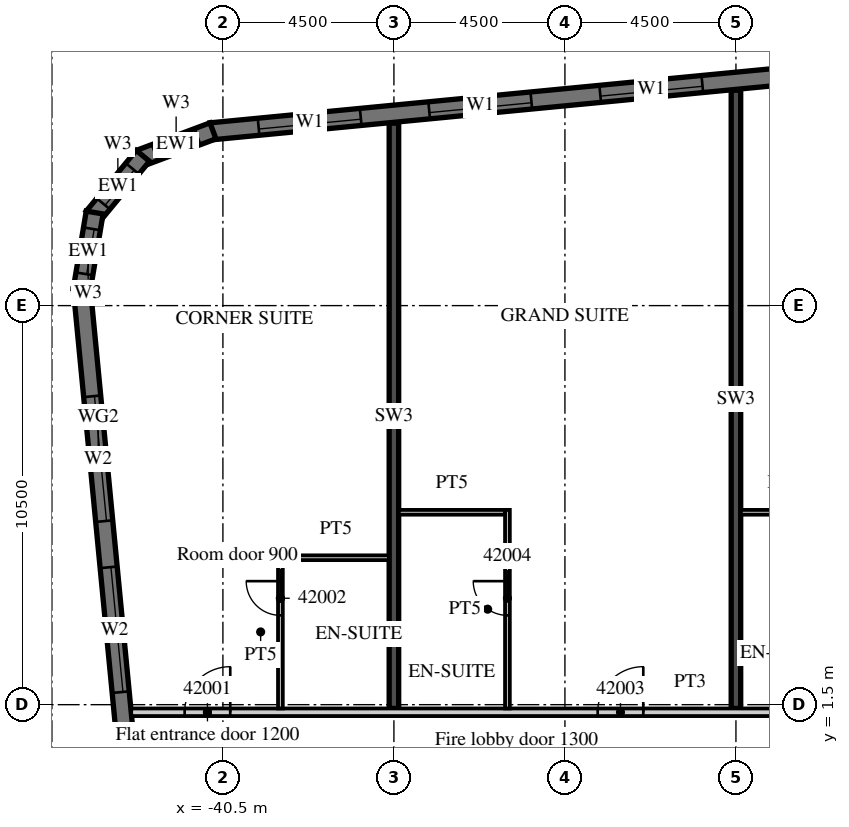
"""IFC4 building model, lengths in metres.
Left out: names, types, materials, properties, quantities, classifications, styles, units other than length and angle.
Written with IfcOpenShell. Run it as: python <this file> out.ifc"""

import sys

from ifc_helpers import new_model, si_unit, direction, frame, frame_2d, origin, place, context, subcontext, project, spatial, polyline, rectangle, outline, extrude, element, fill, save


model = new_model("IFC4")
c1 = context("Model", 3, precision=1e-05, world=origin(), true_north=direction((0.0, 1.0)))
c2 = subcontext(c1, "Body", "Model", "MODEL_VIEW")
j1 = project(units=[si_unit("LENGTHUNIT", "METRE"), si_unit("PLANEANGLEUNIT", "RADIAN")], contexts=[c1])
p1 = place(None, origin())
s1 = spatial("IfcSite", under=j1, at=p1, CompositionType="ELEMENT")
p2 = place(p1, origin())
s2 = spatial("IfcBuilding", under=s1, at=p2, CompositionType="ELEMENT")
p3 = place(p2, frame((0.0, 0.0, 180.1)))
s3 = spatial("IfcBuildingStorey", under=s2, at=p3, CompositionType="ELEMENT", Elevation=180.1)
p4 = place(p3, frame((-36.0, 1.4, 0.0), z_axis=(0.0, 0.0, 1.0), x_axis=(0.0, 1.0, 0.0)))
e1 = element("IfcWall", 1, at=p4, inside=s3, PredefinedType="SHEAR", context=c2, shape_type="SweptSolid", body=[
    extrude(rectangle(XDim=15.401, YDim=0.25, at=frame_2d((7.701, 0.0))), origin(), (0.0, 0.0, 1.0), 3.3),
])
p5 = place(p3, frame((-27.0, 1.4, 0.0), z_axis=(0.0, 0.0, 1.0), x_axis=(0.0, 1.0, 0.0)))
e2 = element("IfcWall", 2, at=p5, inside=s3, PredefinedType="SHEAR", context=c2, shape_type="SweptSolid", body=[
    extrude(rectangle(XDim=16.268, YDim=0.25, at=frame_2d((8.134, 0.0))), origin(), (0.0, 0.0, 1.0), 3.3),
])
p6 = place(p3, frame((-44.214, 12.466, 0.0), z_axis=(0.0, 0.0, 1.0), x_axis=(0.095847314626, -0.995396047952, 0.0)))
e3 = element("IfcWall", 3, at=p6, inside=s3, PredefinedType="SOLIDWALL", context=c2, shape_type="SweptSolid", body=[
    extrude(rectangle(XDim=34.0, YDim=0.45, at=frame_2d((17.0, 0.0))), origin(), (0.0, 0.0, 1.0), 3.02),
])
p7 = place(p6, frame((2.865, 0.0, 0.45)))
e4 = element("IfcOpeningElement", 4, at=p7, cuts=e3, PredefinedType="OPENING", context=c2, shape_type="SweptSolid", body=[
    extrude(rectangle(XDim=3.3, YDim=2.25, at=frame_2d((1.65, 1.125))), frame((0.0, 0.235, 0.0), z_axis=(0.0, -1.0, 0.0), x_axis=(1.0, 0.0, 0.0)), (0.0, 0.0, 1.0), 0.47),
])
p8 = place(p6, frame((7.386, 0.0, 0.45)))
e5 = element("IfcOpeningElement", 5, at=p8, cuts=e3, PredefinedType="OPENING", context=c2, shape_type="SweptSolid", body=[
    extrude(rectangle(XDim=3.3, YDim=2.25, at=frame_2d((1.65, 1.125))), frame((0.0, 0.235, 0.0), z_axis=(0.0, -1.0, 0.0), x_axis=(1.0, 0.0, 0.0)), (0.0, 0.0, 1.0), 0.47),
])
p9 = place(p3, frame((13.521, 21.817, 0.0), z_axis=(0.0, 0.0, 1.0), x_axis=(-0.995396508751, -0.095842529008, 0.0)))
e6 = element("IfcWall", 6, at=p9, inside=s3, PredefinedType="SOLIDWALL", context=c2, shape_type="SweptSolid", body=[
    extrude(rectangle(XDim=54.591, YDim=0.45, at=frame_2d((27.296, 0.0))), origin(), (0.0, 0.0, 1.0), 3.02),
])
p10 = place(p9, frame((0.91, 0.0, 0.45)))
e7 = element("IfcOpeningElement", 7, at=p10, cuts=e6, PredefinedType="OPENING", context=c2, shape_type="SweptSolid", body=[
    extrude(rectangle(XDim=2.7, YDim=2.25, at=frame_2d((1.35, 1.125))), frame((0.0, 0.235, 0.0), z_axis=(0.0, -1.0, 0.0), x_axis=(1.0, 0.0, 0.0)), (0.0, 0.0, 1.0), 0.47),
])
p11 = place(p9, frame((5.431, 0.0, 0.45)))
e8 = element("IfcOpeningElement", 8, at=p11, cuts=e6, PredefinedType="OPENING", context=c2, shape_type="SweptSolid", body=[
    extrude(rectangle(XDim=2.7, YDim=2.25, at=frame_2d((1.35, 1.125))), frame((0.0, 0.235, 0.0), z_axis=(0.0, -1.0, 0.0), x_axis=(1.0, 0.0, 0.0)), (0.0, 0.0, 1.0), 0.47),
])
p12 = place(p9, frame((9.952, 0.0, 0.45)))
e9 = element("IfcOpeningElement", 9, at=p12, cuts=e6, PredefinedType="OPENING", context=c2, shape_type="SweptSolid", body=[
    extrude(rectangle(XDim=2.7, YDim=2.25, at=frame_2d((1.35, 1.125))), frame((0.0, 0.235, 0.0), z_axis=(0.0, -1.0, 0.0), x_axis=(1.0, 0.0, 0.0)), (0.0, 0.0, 1.0), 0.47),
])
p13 = place(p9, frame((14.473, 0.0, 0.45)))
e10 = element("IfcOpeningElement", 10, at=p13, cuts=e6, PredefinedType="OPENING", context=c2, shape_type="SweptSolid", body=[
    extrude(rectangle(XDim=2.7, YDim=2.25, at=frame_2d((1.35, 1.125))), frame((0.0, 0.235, 0.0), z_axis=(0.0, -1.0, 0.0), x_axis=(1.0, 0.0, 0.0)), (0.0, 0.0, 1.0), 0.47),
])
p14 = place(p9, frame((18.994, 0.0, 0.45)))
e11 = element("IfcOpeningElement", 11, at=p14, cuts=e6, PredefinedType="OPENING", context=c2, shape_type="SweptSolid", body=[
    extrude(rectangle(XDim=2.7, YDim=2.25, at=frame_2d((1.35, 1.125))), frame((0.0, 0.235, 0.0), z_axis=(0.0, -1.0, 0.0), x_axis=(1.0, 0.0, 0.0)), (0.0, 0.0, 1.0), 0.47),
])
p15 = place(p9, frame((23.514, 0.0, 0.45)))
e12 = element("IfcOpeningElement", 12, at=p15, cuts=e6, PredefinedType="OPENING", context=c2, shape_type="SweptSolid", body=[
    extrude(rectangle(XDim=2.7, YDim=2.25, at=frame_2d((1.35, 1.125))), frame((0.0, 0.235, 0.0), z_axis=(0.0, -1.0, 0.0), x_axis=(1.0, 0.0, 0.0)), (0.0, 0.0, 1.0), 0.47),
])
p16 = place(p9, frame((28.035, 0.0, 0.45)))
e13 = element("IfcOpeningElement", 13, at=p16, cuts=e6, PredefinedType="OPENING", context=c2, shape_type="SweptSolid", body=[
    extrude(rectangle(XDim=2.7, YDim=2.25, at=frame_2d((1.35, 1.125))), frame((0.0, 0.235, 0.0), z_axis=(0.0, -1.0, 0.0), x_axis=(1.0, 0.0, 0.0)), (0.0, 0.0, 1.0), 0.47),
])
p17 = place(p9, frame((32.556, 0.0, 0.45)))
e14 = element("IfcOpeningElement", 14, at=p17, cuts=e6, PredefinedType="OPENING", context=c2, shape_type="SweptSolid", body=[
    extrude(rectangle(XDim=2.7, YDim=2.25, at=frame_2d((1.35, 1.125))), frame((0.0, 0.235, 0.0), z_axis=(0.0, -1.0, 0.0), x_axis=(1.0, 0.0, 0.0)), (0.0, 0.0, 1.0), 0.47),
])
p18 = place(p9, frame((37.077, 0.0, 0.45)))
e15 = element("IfcOpeningElement", 15, at=p18, cuts=e6, PredefinedType="OPENING", context=c2, shape_type="SweptSolid", body=[
    extrude(rectangle(XDim=2.7, YDim=2.25, at=frame_2d((1.35, 1.125))), frame((0.0, 0.235, 0.0), z_axis=(0.0, -1.0, 0.0), x_axis=(1.0, 0.0, 0.0)), (0.0, 0.0, 1.0), 0.47),
])
p19 = place(p9, frame((41.598, 0.0, 0.45)))
e16 = element("IfcOpeningElement", 16, at=p19, cuts=e6, PredefinedType="OPENING", context=c2, shape_type="SweptSolid", body=[
    extrude(rectangle(XDim=2.7, YDim=2.25, at=frame_2d((1.35, 1.125))), frame((0.0, 0.235, 0.0), z_axis=(0.0, -1.0, 0.0), x_axis=(1.0, 0.0, 0.0)), (0.0, 0.0, 1.0), 0.47),
])
p20 = place(p9, frame((46.118, 0.0, 0.45)))
e17 = element("IfcOpeningElement", 17, at=p20, cuts=e6, PredefinedType="OPENING", context=c2, shape_type="SweptSolid", body=[
    extrude(rectangle(XDim=2.7, YDim=2.25, at=frame_2d((1.35, 1.125))), frame((0.0, 0.235, 0.0), z_axis=(0.0, -1.0, 0.0), x_axis=(1.0, 0.0, 0.0)), (0.0, 0.0, 1.0), 0.47),
])
p21 = place(p9, frame((50.629, 0.0, 0.45)))
e18 = element("IfcOpeningElement", 18, at=p21, cuts=e6, PredefinedType="OPENING", context=c2, shape_type="SweptSolid", body=[
    extrude(rectangle(XDim=2.7, YDim=2.25, at=frame_2d((1.35, 1.125))), frame((0.0, 0.235, 0.0), z_axis=(0.0, -1.0, 0.0), x_axis=(1.0, 0.0, 0.0)), (0.0, 0.0, 1.0), 0.47),
])
p22 = place(p3, frame((-40.761, 16.598, 0.0), z_axis=(0.0, 0.0, 1.0), x_axis=(-0.936677599948, -0.350192909346, 0.0)))
e19 = element("IfcWall", 19, at=p22, inside=s3, PredefinedType="SOLIDWALL", context=c2, shape_type="SweptSolid", body=[
    extrude(outline(polyline([(0.0, -0.225), (2.071, -0.225), (1.95, 0.225), (0.121, 0.225), (0.0, -0.225)])), origin(), (0.0, 0.0, 1.0), 3.02),
])
p23 = place(p22, frame((0.435, 0.0, 0.45)))
e20 = element("IfcOpeningElement", 20, at=p23, cuts=e19, PredefinedType="OPENING", context=c2, shape_type="SweptSolid", body=[
    extrude(rectangle(XDim=1.2, YDim=2.25, at=frame_2d((0.6, 1.125))), frame((0.0, 0.235, 0.0), z_axis=(0.0, -1.0, 0.0), x_axis=(1.0, 0.0, 0.0)), (0.0, 0.0, 1.0), 0.47),
])
p24 = place(p3, frame((-42.606, 15.941, 0.0), z_axis=(0.0, 0.0, 1.0), x_axis=(-0.636116318187, -0.771593176315, 0.0)))
e21 = element("IfcWall", 21, at=p24, inside=s3, PredefinedType="SOLIDWALL", context=c2, shape_type="SweptSolid", body=[
    extrude(outline(polyline([(0.0, -0.225), (2.071, -0.225), (1.95, 0.225), (0.121, 0.225), (0.0, -0.225)])), origin(), (0.0, 0.0, 1.0), 3.02),
])
p25 = place(p24, frame((0.435, 0.0, 0.45)))
e22 = element("IfcOpeningElement", 22, at=p25, cuts=e21, PredefinedType="OPENING", context=c2, shape_type="SweptSolid", body=[
    extrude(rectangle(XDim=1.2, YDim=2.25, at=frame_2d((0.6, 1.125))), frame((0.0, 0.235, 0.0), z_axis=(0.0, -1.0, 0.0), x_axis=(1.0, 0.0, 0.0)), (0.0, 0.0, 1.0), 0.47),
])
p26 = place(p3, frame((-43.875, 14.449, 0.0), z_axis=(0.0, 0.0, 1.0), x_axis=(-0.164953448126, -0.986301353518, 0.0)))
e23 = element("IfcWall", 23, at=p26, inside=s3, PredefinedType="SOLIDWALL", context=c2, shape_type="SweptSolid", body=[
    extrude(outline(polyline([(0.0, -0.225), (2.071, -0.225), (1.95, 0.225), (0.121, 0.225), (0.0, -0.225)])), origin(), (0.0, 0.0, 1.0), 3.02),
])
p27 = place(p26, frame((0.435, 0.0, 0.45)))
e24 = element("IfcOpeningElement", 24, at=p27, cuts=e23, PredefinedType="OPENING", context=c2, shape_type="SweptSolid", body=[
    extrude(rectangle(XDim=1.2, YDim=2.25, at=frame_2d((0.6, 1.125))), frame((0.0, 0.235, 0.0), z_axis=(0.0, -1.0, 0.0), x_axis=(1.0, 0.0, 0.0)), (0.0, 0.0, 1.0), 0.47),
])
p28 = place(p3, frame((-42.913, 1.3, 0.0), z_axis=(0.0, 0.0, 1.0), x_axis=(1.0, 0.0, 0.0)))
e25 = element("IfcWall", 25, at=p28, inside=s3, PredefinedType="PARTITIONING", context=c2, shape_type="SweptSolid", body=[
    extrude(rectangle(XDim=29.413, YDim=0.2, at=frame_2d((14.707, 0.0))), origin(), (0.0, 0.0, 1.0), 3.02),
])
p29 = place(p28, frame((1.406, 0.0, 0.0)))
e26 = element("IfcOpeningElement", 26, at=p29, cuts=e25, PredefinedType="OPENING", context=c2, shape_type="SweptSolid", body=[
    extrude(rectangle(XDim=1.2, YDim=2.1, at=frame_2d((0.6, 1.05))), frame((0.0, 0.11, 0.0), z_axis=(0.0, -1.0, 0.0), x_axis=(1.0, 0.0, 0.0)), (0.0, 0.0, 1.0), 0.22),
])
p30 = place(p28, frame((12.275, 0.0, 0.0)))
e27 = element("IfcOpeningElement", 27, at=p30, cuts=e25, PredefinedType="OPENING", context=c2, shape_type="SweptSolid", body=[
    extrude(rectangle(XDim=1.2, YDim=2.1, at=frame_2d((0.6, 1.05))), frame((0.0, 0.11, 0.0), z_axis=(0.0, -1.0, 0.0), x_axis=(1.0, 0.0, 0.0)), (0.0, 0.0, 1.0), 0.22),
])
p31 = place(p28, frame((18.863, 0.0, 0.0)))
e28 = element("IfcOpeningElement", 28, at=p31, cuts=e25, PredefinedType="OPENING", context=c2, shape_type="SweptSolid", body=[
    extrude(rectangle(XDim=1.0, YDim=2.1, at=frame_2d((0.5, 1.05))), frame((0.0, 0.11, 0.0), z_axis=(0.0, -1.0, 0.0), x_axis=(1.0, 0.0, 0.0)), (0.0, 0.0, 1.0), 0.22),
])
p32 = place(p28, frame((23.338, 0.0, 0.0)))
e29 = element("IfcOpeningElement", 29, at=p32, cuts=e25, PredefinedType="OPENING", context=c2, shape_type="SweptSolid", body=[
    extrude(rectangle(XDim=1.0, YDim=2.1, at=frame_2d((0.5, 1.05))), frame((0.0, 0.11, 0.0), z_axis=(0.0, -1.0, 0.0), x_axis=(1.0, 0.0, 0.0)), (0.0, 0.0, 1.0), 0.22),
])
p33 = place(p28, frame((27.838, 0.0, 0.0)))
e30 = element("IfcOpeningElement", 30, at=p33, cuts=e25, PredefinedType="OPENING", context=c2, shape_type="SweptSolid", body=[
    extrude(rectangle(XDim=1.0, YDim=2.1, at=frame_2d((0.5, 1.05))), frame((0.0, 0.11, 0.0), z_axis=(0.0, -1.0, 0.0), x_axis=(1.0, 0.0, 0.0)), (0.0, 0.0, 1.0), 0.22),
])
p34 = place(p3, frame((-38.987, 1.4, 0.0), z_axis=(0.0, 0.0, 1.0), x_axis=(0.0, 1.0, 0.0)))
e31 = element("IfcWall", 31, at=p34, inside=s3, PredefinedType="PARTITIONING", context=c2, shape_type="SweptSolid", body=[
    extrude(rectangle(XDim=4.028, YDim=0.125, at=frame_2d((2.014, 0.0))), origin(), (0.0, 0.0, 1.0), 3.02),
])
p35 = place(p34, frame((2.45, 0.0, 0.0)))
e32 = element("IfcOpeningElement", 32, at=p35, cuts=e31, PredefinedType="OPENING", context=c2, shape_type="SweptSolid", body=[
    extrude(rectangle(XDim=0.9, YDim=2.1, at=frame_2d((0.45, 1.05))), frame((0.0, 0.073, 0.0), z_axis=(0.0, -1.0, 0.0), x_axis=(1.0, 0.0, 0.0)), (0.0, 0.0, 1.0), 0.145),
])
p36 = place(p3, frame((-38.925, 5.366, 0.0), z_axis=(0.0, 0.0, 1.0), x_axis=(1.0, 0.0, 0.0)))
e33 = element("IfcWall", 33, at=p36, inside=s3, PredefinedType="PARTITIONING", context=c2, shape_type="SweptSolid", body=[
    extrude(rectangle(XDim=2.8, YDim=0.125, at=frame_2d((1.4, 0.0))), origin(), (0.0, 0.0, 1.0), 3.02),
])
p37 = place(p3, frame((-33.013, 1.4, 0.0), z_axis=(0.0, 0.0, 1.0), x_axis=(0.0, 1.0, 0.0)))
e34 = element("IfcWall", 34, at=p37, inside=s3, PredefinedType="PARTITIONING", context=c2, shape_type="SweptSolid", body=[
    extrude(rectangle(XDim=5.225, YDim=0.125, at=frame_2d((2.613, 0.0))), origin(), (0.0, 0.0, 1.0), 3.02),
])
p38 = place(p37, frame((2.45, 0.0, 0.0)))
e35 = element("IfcOpeningElement", 35, at=p38, cuts=e34, PredefinedType="OPENING", context=c2, shape_type="SweptSolid", body=[
    extrude(rectangle(XDim=0.9, YDim=2.1, at=frame_2d((0.45, 1.05))), frame((0.0, 0.073, 0.0), z_axis=(0.0, -1.0, 0.0), x_axis=(1.0, 0.0, 0.0)), (0.0, 0.0, 1.0), 0.145),
])
p39 = place(p3, frame((-35.875, 6.562, 0.0), z_axis=(0.0, 0.0, 1.0), x_axis=(1.0, 0.0, 0.0)))
e36 = element("IfcWall", 36, at=p39, inside=s3, PredefinedType="PARTITIONING", context=c2, shape_type="SweptSolid", body=[
    extrude(rectangle(XDim=2.8, YDim=0.125, at=frame_2d((1.4, 0.0))), origin(), (0.0, 0.0, 1.0), 3.02),
])
p40 = place(p3, frame((-26.875, 6.562, 0.0), z_axis=(0.0, 0.0, 1.0), x_axis=(1.0, 0.0, 0.0)))
e37 = element("IfcWall", 37, at=p40, inside=s3, PredefinedType="PARTITIONING", context=c2, shape_type="SweptSolid", body=[
    extrude(rectangle(XDim=2.25, YDim=0.125, at=frame_2d((1.125, 0.0))), origin(), (0.0, 0.0, 1.0), 3.02),
])
p41 = place(p7, origin())
e38 = element("IfcWindow", 38, at=p41, inside=s3, PartitioningType="SINGLE_PANEL", PredefinedType="WINDOW", context=c2, shape_type="SweptSolid", body=[
    extrude(rectangle(XDim=3.3, YDim=2.25, at=frame_2d((1.65, 1.125))), frame((0.0, 0.09, 0.0), z_axis=(0.0, -1.0, 0.0), x_axis=(1.0, 0.0, 0.0)), (0.0, 0.0, 1.0), 0.06),
])
fill(e4, e38)
p42 = place(p8, origin())
e39 = element("IfcWindow", 39, at=p42, inside=s3, PartitioningType="SINGLE_PANEL", PredefinedType="WINDOW", context=c2, shape_type="SweptSolid", body=[
    extrude(rectangle(XDim=3.3, YDim=2.25, at=frame_2d((1.65, 1.125))), frame((0.0, 0.09, 0.0), z_axis=(0.0, -1.0, 0.0), x_axis=(1.0, 0.0, 0.0)), (0.0, 0.0, 1.0), 0.06),
])
fill(e5, e39)
p43 = place(p19, origin())
e40 = element("IfcWindow", 40, at=p43, inside=s3, PartitioningType="SINGLE_PANEL", PredefinedType="WINDOW", context=c2, shape_type="SweptSolid", body=[
    extrude(rectangle(XDim=2.7, YDim=2.25, at=frame_2d((1.35, 1.125))), frame((0.0, 0.09, 0.0), z_axis=(0.0, -1.0, 0.0), x_axis=(1.0, 0.0, 0.0)), (0.0, 0.0, 1.0), 0.06),
])
fill(e16, e40)
p44 = place(p20, origin())
e41 = element("IfcWindow", 41, at=p44, inside=s3, PartitioningType="SINGLE_PANEL", PredefinedType="WINDOW", context=c2, shape_type="SweptSolid", body=[
    extrude(rectangle(XDim=2.7, YDim=2.25, at=frame_2d((1.35, 1.125))), frame((0.0, 0.09, 0.0), z_axis=(0.0, -1.0, 0.0), x_axis=(1.0, 0.0, 0.0)), (0.0, 0.0, 1.0), 0.06),
])
fill(e17, e41)
p45 = place(p21, origin())
e42 = element("IfcWindow", 42, at=p45, inside=s3, PartitioningType="SINGLE_PANEL", PredefinedType="WINDOW", context=c2, shape_type="SweptSolid", body=[
    extrude(rectangle(XDim=2.7, YDim=2.25, at=frame_2d((1.35, 1.125))), frame((0.0, 0.09, 0.0), z_axis=(0.0, -1.0, 0.0), x_axis=(1.0, 0.0, 0.0)), (0.0, 0.0, 1.0), 0.06),
])
fill(e18, e42)
p46 = place(p23, origin())
e43 = element("IfcWindow", 43, at=p46, inside=s3, PartitioningType="SINGLE_PANEL", PredefinedType="WINDOW", context=c2, shape_type="SweptSolid", body=[
    extrude(rectangle(XDim=1.2, YDim=2.25, at=frame_2d((0.6, 1.125))), frame((0.0, 0.09, 0.0), z_axis=(0.0, -1.0, 0.0), x_axis=(1.0, 0.0, 0.0)), (0.0, 0.0, 1.0), 0.06),
])
fill(e20, e43)
p47 = place(p25, origin())
e44 = element("IfcWindow", 44, at=p47, inside=s3, PartitioningType="SINGLE_PANEL", PredefinedType="WINDOW", context=c2, shape_type="SweptSolid", body=[
    extrude(rectangle(XDim=1.2, YDim=2.25, at=frame_2d((0.6, 1.125))), frame((0.0, 0.09, 0.0), z_axis=(0.0, -1.0, 0.0), x_axis=(1.0, 0.0, 0.0)), (0.0, 0.0, 1.0), 0.06),
])
fill(e22, e44)
p48 = place(p27, origin())
e45 = element("IfcWindow", 45, at=p48, inside=s3, PartitioningType="SINGLE_PANEL", PredefinedType="WINDOW", context=c2, shape_type="SweptSolid", body=[
    extrude(rectangle(XDim=1.2, YDim=2.25, at=frame_2d((0.6, 1.125))), frame((0.0, 0.09, 0.0), z_axis=(0.0, -1.0, 0.0), x_axis=(1.0, 0.0, 0.0)), (0.0, 0.0, 1.0), 0.06),
])
fill(e24, e45)
p49 = place(p29, origin())
e46 = element("IfcDoor", 46, at=p49, inside=s3, OperationType="SINGLE_SWING_RIGHT", PredefinedType="DOOR", context=c2, shape_type="SweptSolid", body=[
    extrude(rectangle(XDim=1.2, YDim=2.1, at=frame_2d((0.6, 1.05))), frame((0.0, 0.025, 0.0), z_axis=(0.0, -1.0, 0.0), x_axis=(1.0, 0.0, 0.0)), (0.0, 0.0, 1.0), 0.05),
])
fill(e26, e46)
p50 = place(p35, origin())
e47 = element("IfcDoor", 47, at=p50, inside=s3, OperationType="SINGLE_SWING_RIGHT", PredefinedType="DOOR", context=c2, shape_type="SweptSolid", body=[
    extrude(rectangle(XDim=0.9, YDim=2.1, at=frame_2d((0.45, 1.05))), frame((0.0, 0.025, 0.0), z_axis=(0.0, -1.0, 0.0), x_axis=(1.0, 0.0, 0.0)), (0.0, 0.0, 1.0), 0.05),
])
fill(e32, e47)
p51 = place(p30, origin())
e48 = element("IfcDoor", 48, at=p51, inside=s3, OperationType="SINGLE_SWING_RIGHT", PredefinedType="DOOR", context=c2, shape_type="SweptSolid", body=[
    extrude(rectangle(XDim=1.2, YDim=2.1, at=frame_2d((0.6, 1.05))), frame((0.0, 0.025, 0.0), z_axis=(0.0, -1.0, 0.0), x_axis=(1.0, 0.0, 0.0)), (0.0, 0.0, 1.0), 0.05),
])
fill(e27, e48)
p52 = place(p38, origin())
e49 = element("IfcDoor", 49, at=p52, inside=s3, OperationType="SINGLE_SWING_RIGHT", PredefinedType="DOOR", context=c2, shape_type="SweptSolid", body=[
    extrude(rectangle(XDim=0.9, YDim=2.1, at=frame_2d((0.45, 1.05))), frame((0.0, 0.025, 0.0), z_axis=(0.0, -1.0, 0.0), x_axis=(1.0, 0.0, 0.0)), (0.0, 0.0, 1.0), 0.05),
])
fill(e35, e49)
save(model, sys.argv[1])
